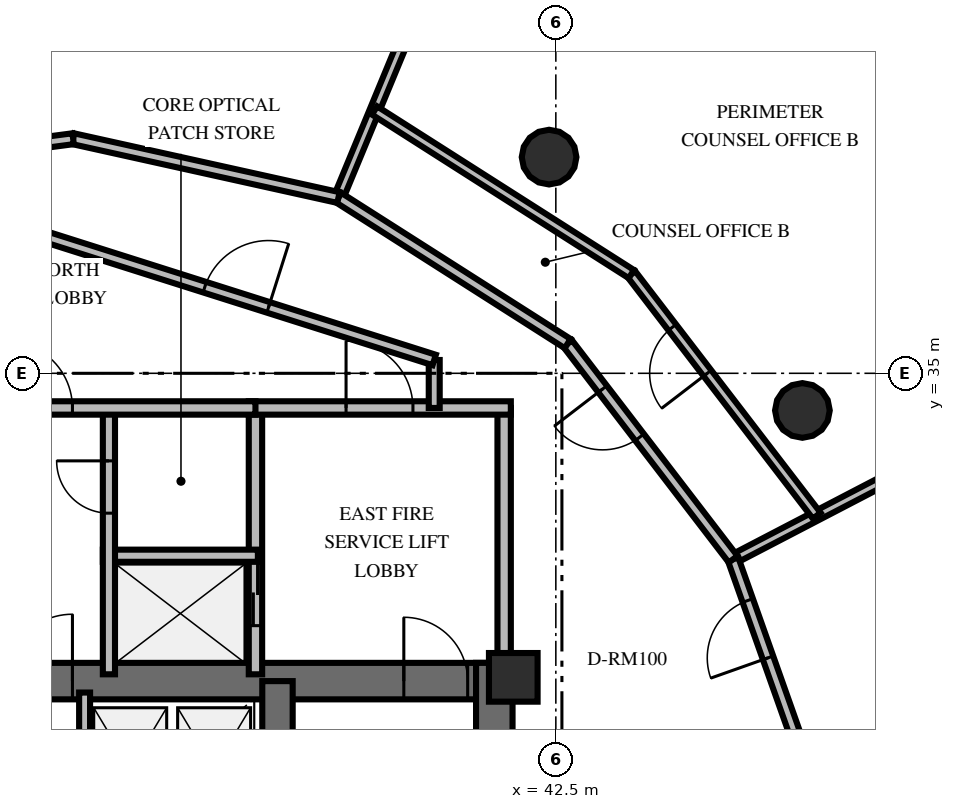
"""IFC4 building model, lengths in metres.
Left out: names, types, materials, properties, quantities, classifications, styles, units other than length and angle.
Written with IfcOpenShell. Run it as: python <this file> out.ifc"""

import sys

from ifc_helpers import new_model, si_unit, direction, frame, frame_2d, origin, origin_2d, place, context, subcontext, project, spatial, rectangle, circle, extrude, element, fill, save


model = new_model("IFC4")
c1 = context("Model", 3, precision=1e-05, world=origin(), true_north=direction((0.0, 1.0)))
c2 = subcontext(c1, "Body", "Model", "MODEL_VIEW")
j1 = project(units=[si_unit("LENGTHUNIT", "METRE"), si_unit("PLANEANGLEUNIT", "RADIAN")], contexts=[c1])
p1 = place(None, origin())
s1 = spatial("IfcSite", under=j1, at=p1, CompositionType="ELEMENT")
p2 = place(p1, origin())
s2 = spatial("IfcBuilding", under=s1, at=p2, CompositionType="ELEMENT")
p3 = place(p2, frame((0.0, 0.0, 230.4)))
s3 = spatial("IfcBuildingStorey", under=s2, at=p3, CompositionType="ELEMENT", Elevation=230.4)
p4 = place(p3, frame((26.222, 29.938, 0.0), z_axis=(0.0, 0.0, 1.0), x_axis=(1.0, 0.0, 0.0)))
e1 = element("IfcWall", 1, at=p4, inside=s3, PredefinedType="SHEAR", context=c2, shape_type="SweptSolid", body=[
    extrude(rectangle(XDim=15.566, YDim=0.6, at=frame_2d((7.783, 0.0))), origin(), (0.0, 0.0, 1.0), 3.6),
])
p5 = place(p4, frame((0.728, 0.0, 0.0)))
e2 = element("IfcOpeningElement", 2, at=p5, cuts=e1, PredefinedType="OPENING", context=c2, shape_type="SweptSolid", body=[
    extrude(rectangle(XDim=1.05, YDim=2.15, at=frame_2d((0.525, 1.075))), frame((0.0, 0.31, 0.0), z_axis=(0.0, -1.0, 0.0), x_axis=(1.0, 0.0, 0.0)), (0.0, 0.0, 1.0), 0.62),
])
p6 = place(p4, frame((13.778, 0.0, 0.0)))
e3 = element("IfcOpeningElement", 3, at=p6, cuts=e1, PredefinedType="OPENING", context=c2, shape_type="SweptSolid", body=[
    extrude(rectangle(XDim=1.05, YDim=2.15, at=frame_2d((0.525, 1.075))), frame((0.0, 0.31, 0.0), z_axis=(0.0, -1.0, 0.0), x_axis=(1.0, 0.0, 0.0)), (0.0, 0.0, 1.0), 0.62),
])
p7 = place(p4, frame((7.228, 0.0, 0.0)))
e4 = element("IfcOpeningElement", 4, at=p7, cuts=e1, PredefinedType="OPENING", context=c2, shape_type="SweptSolid", body=[
    extrude(rectangle(XDim=1.1, YDim=2.15, at=frame_2d((0.55, 1.075))), frame((0.0, 0.31, 0.0), z_axis=(0.0, -1.0, 0.0), x_axis=(1.0, 0.0, 0.0)), (0.0, 0.0, 1.0), 0.62),
])
p8 = place(p3, frame((41.488, 19.962, 0.0), z_axis=(0.0, 0.0, 1.0), x_axis=(0.0, 1.0, 0.0)))
e5 = element("IfcWall", 5, at=p8, inside=s3, PredefinedType="SHEAR", context=c2, shape_type="SweptSolid", body=[
    extrude(rectangle(XDim=10.276, YDim=0.6, at=frame_2d((5.138, 0.0))), origin(), (0.0, 0.0, 1.0), 3.6),
])
p9 = place(p3, frame((37.922, 20.262, 0.0), z_axis=(0.0, 0.0, 1.0), x_axis=(0.0, 1.0, 0.0)))
e6 = element("IfcWall", 6, at=p9, inside=s3, PredefinedType="SHEAR", context=c2, shape_type="SweptSolid", body=[
    extrude(rectangle(XDim=9.676, YDim=0.5, at=frame_2d((4.838, 0.0))), origin(), (0.0, 0.0, 1.0), 3.6),
])
p10 = place(p3, frame((41.8, 30.0, 0.0), z_axis=(0.0, 0.0, 1.0), x_axis=(1.0, 0.0, 0.0)))
e7 = element("IfcColumn", 7, at=p10, inside=s3, PredefinedType="PILASTER", context=c2, shape_type="SweptSolid", body=[
    extrude(rectangle(XDim=0.8, YDim=0.8, at=origin_2d()), origin(), (0.0, 0.0, 1.0), 3.6),
])
for number, where, z_axis, x_axis in (
    (8, (46.555, 34.389, -0.22), (0.0, 0.0, 1.0), (1.0, 0.0, 0.0)),
    (9, (42.389, 38.555, -0.22), (0.0, 0.0, 1.0), (1.0, 0.0, 0.0)),
):
    element("IfcColumn", number, at=place(p3, frame(where, z_axis=z_axis, x_axis=x_axis)), inside=s3, PredefinedType="COLUMN", context=c2, shape_type="SweptSolid", body=[
        extrude(circle(Radius=0.45, at=origin_2d()), origin(), (0.0, 0.0, 1.0), 3.82),
    ])
p11 = place(p3, frame((37.56, 30.05, 0.0), z_axis=(0.0, 0.0, 1.0), x_axis=(0.0, 1.0, 0.0)))
e10 = element("IfcWall", 10, at=p11, inside=s3, PredefinedType="SOLIDWALL", context=c2, shape_type="SweptSolid", body=[
    extrude(rectangle(XDim=4.38, YDim=0.22, at=frame_2d((2.19, 0.0))), origin(), (0.0, 0.0, 1.0), 2.46),
])
p12 = place(p11, frame((0.8, 0.0, 0.0)))
e11 = element("IfcOpeningElement", 11, at=p12, cuts=e10, PredefinedType="OPENING", context=c2, shape_type="SweptSolid", body=[
    extrude(rectangle(XDim=1.05, YDim=2.1, at=frame_2d((0.525, 1.05))), frame((0.0, 0.12, 0.0), z_axis=(0.0, -1.0, 0.0), x_axis=(1.0, 0.0, 0.0)), (0.0, 0.0, 1.0), 0.24),
])
p13 = place(p3, frame((41.65, 30.05, 0.0), z_axis=(0.0, 0.0, 1.0), x_axis=(0.0, 1.0, 0.0)))
e12 = element("IfcWall", 12, at=p13, inside=s3, PredefinedType="SOLIDWALL", context=c2, shape_type="SweptSolid", body=[
    extrude(rectangle(XDim=4.38, YDim=0.22, at=frame_2d((2.19, 0.0))), origin(), (0.0, 0.0, 1.0), 2.46),
])
p14 = place(p3, frame((37.45, 34.43, 0.0), z_axis=(0.0, 0.0, 1.0), x_axis=(1.0, 0.0, 0.0)))
e13 = element("IfcWall", 13, at=p14, inside=s3, PredefinedType="SOLIDWALL", context=c2, shape_type="SweptSolid", body=[
    extrude(rectangle(XDim=4.31, YDim=0.22, at=frame_2d((2.155, 0.0))), origin(), (0.0, 0.0, 1.0), 2.46),
])
p15 = place(p14, frame((1.6, 0.0, 0.0)))
e14 = element("IfcOpeningElement", 14, at=p15, cuts=e13, PredefinedType="OPENING", context=c2, shape_type="SweptSolid", body=[
    extrude(rectangle(XDim=1.1, YDim=2.15, at=frame_2d((0.55, 1.075))), frame((0.0, 0.12, 0.0), z_axis=(0.0, -1.0, 0.0), x_axis=(1.0, 0.0, 0.0)), (0.0, 0.0, 1.0), 0.24),
])
p16 = place(p3, frame((35.05, 32.0, 0.0), z_axis=(0.0, 0.0, 1.0), x_axis=(1.0, 0.0, 0.0)))
e15 = element("IfcWall", 15, at=p16, inside=s3, PredefinedType="SOLIDWALL", context=c2, shape_type="SweptSolid", body=[
    extrude(rectangle(XDim=2.55, YDim=0.2, at=frame_2d((1.275, 0.0))), origin(), (0.0, 0.0, 1.0), 2.46),
])
p17 = place(p3, frame((35.15, 30.05, 0.0), z_axis=(0.0, 0.0, 1.0), x_axis=(0.0, 1.0, 0.0)))
e16 = element("IfcWall", 16, at=p17, inside=s3, PredefinedType="SOLIDWALL", context=c2, shape_type="SweptSolid", body=[
    extrude(rectangle(XDim=4.38, YDim=0.2, at=frame_2d((2.19, 0.0))), origin(), (0.0, 0.0, 1.0), 2.46),
])
p18 = place(p17, frame((2.65, 0.0, 0.0)))
e17 = element("IfcOpeningElement", 17, at=p18, cuts=e16, PredefinedType="OPENING", context=c2, shape_type="SweptSolid", body=[
    extrude(rectangle(XDim=0.86, YDim=2.05, at=frame_2d((0.43, 1.025))), frame((0.0, 0.11, 0.0), z_axis=(0.0, -1.0, 0.0), x_axis=(1.0, 0.0, 0.0)), (0.0, 0.0, 1.0), 0.22),
])
p19 = place(p3, frame((30.44, 34.43, 0.0), z_axis=(0.0, 0.0, 1.0), x_axis=(1.0, 0.0, 0.0)))
e18 = element("IfcWall", 18, at=p19, inside=s3, PredefinedType="SOLIDWALL", context=c2, shape_type="SweptSolid", body=[
    extrude(rectangle(XDim=7.12, YDim=0.22, at=frame_2d((3.56, 0.0))), origin(), (0.0, 0.0, 1.0), 2.46),
])
p20 = place(p19, frame((3.01, 0.0, 0.0)))
e19 = element("IfcOpeningElement", 19, at=p20, cuts=e18, PredefinedType="OPENING", context=c2, shape_type="SweptSolid", body=[
    extrude(rectangle(XDim=1.1, YDim=2.15, at=frame_2d((0.55, 1.075))), frame((0.0, 0.12, 0.0), z_axis=(0.0, -1.0, 0.0), x_axis=(1.0, 0.0, 0.0)), (0.0, 0.0, 1.0), 0.24),
])
p21 = place(p3, frame((34.75, 27.28, 0.0), z_axis=(0.0, 0.0, 1.0), x_axis=(0.0, 1.0, 0.0)))
e20 = element("IfcWall", 20, at=p21, inside=s3, PredefinedType="SOLIDWALL", context=c2, shape_type="SweptSolid", body=[
    extrude(rectangle(XDim=2.47, YDim=0.18, at=frame_2d((1.235, 0.0))), origin(), (0.0, 0.0, 1.0), 2.46),
])
p22 = place(p3, frame((40.5, 35.219, 0.0), z_axis=(0.0, 0.0, 1.0), x_axis=(0.0, -1.0, 0.0)))
e21 = element("IfcWall", 21, at=p22, inside=s3, PredefinedType="PARTITIONING", context=c2, shape_type="SweptSolid", body=[
    extrude(rectangle(XDim=0.789, YDim=0.18, at=frame_2d((0.395, 0.0))), origin(), (0.0, 0.0, 1.0), 2.46),
])
p23 = place(p3, frame((34.0, 37.28, 0.0), z_axis=(0.0, 0.0, 1.0), x_axis=(0.953228121756, -0.302251795518, 0.0)))
e22 = element("IfcWall", 22, at=p23, inside=s3, PredefinedType="PARTITIONING", context=c2, shape_type="SweptSolid", body=[
    extrude(rectangle(XDim=6.819, YDim=0.18, at=frame_2d((3.409, 0.0))), origin(), (0.0, 0.0, 1.0), 2.46),
])
p24 = place(p23, frame((2.86, 0.0, 0.0)))
e23 = element("IfcOpeningElement", 23, at=p24, cuts=e22, PredefinedType="OPENING", context=c2, shape_type="SweptSolid", body=[
    extrude(rectangle(XDim=1.1, YDim=2.15, at=frame_2d((0.55, 1.075))), frame((0.0, 0.1, 0.0), z_axis=(0.0, -1.0, 0.0), x_axis=(1.0, 0.0, 0.0)), (0.0, 0.0, 1.0), 0.2),
])
p25 = place(p3, frame((45.416, 31.943, 0.0), z_axis=(0.0, 0.0, 1.0), x_axis=(0.887002051681, 0.461765481943, 0.0)))
e24 = element("IfcWall", 24, at=p25, inside=s3, PredefinedType="PARTITIONING", context=c2, shape_type="SweptSolid", body=[
    extrude(rectangle(XDim=7.318, YDim=0.16, at=frame_2d((3.659, 0.0))), origin(), (0.0, 0.0, 1.0), 2.46),
])
p26 = place(p3, frame((46.612, 28.566, 0.0), z_axis=(0.0, 0.0, 1.0), x_axis=(-0.33381812474, 0.942637501691, 0.0)))
e25 = element("IfcWall", 25, at=p26, inside=s3, PredefinedType="PARTITIONING", context=c2, shape_type="SweptSolid", body=[
    extrude(rectangle(XDim=3.582, YDim=0.18, at=frame_2d((1.791, 0.0))), origin(), (0.0, 0.0, 1.0), 2.46),
])
p27 = place(p26, frame((1.862, 0.0, 0.0)))
e26 = element("IfcOpeningElement", 26, at=p27, cuts=e25, PredefinedType="OPENING", context=c2, shape_type="SweptSolid", body=[
    extrude(rectangle(XDim=1.0, YDim=2.15, at=frame_2d((0.5, 1.075))), frame((0.0, 0.1, 0.0), z_axis=(0.0, -1.0, 0.0), x_axis=(1.0, 0.0, 0.0)), (0.0, 0.0, 1.0), 0.2),
])
p28 = place(p3, frame((38.925, 37.89, 0.0), z_axis=(0.0, 0.0, 1.0), x_axis=(0.382676871851, 0.923882249938, 0.0)))
e27 = element("IfcWall", 27, at=p28, inside=s3, PredefinedType="PARTITIONING", context=c2, shape_type="SweptSolid", body=[
    extrude(rectangle(XDim=7.318, YDim=0.16, at=frame_2d((3.659, 0.0))), origin(), (0.0, 0.0, 1.0), 2.46),
])
p29 = place(p3, frame((45.416, 31.943, 0.0), z_axis=(0.0, 0.0, 1.0), x_axis=(-0.608746835117, 0.793364538365, 0.0)))
e28 = element("IfcWall", 28, at=p29, inside=s3, PredefinedType="PARTITIONING", context=c2, shape_type="SweptSolid", body=[
    extrude(rectangle(XDim=4.47, YDim=0.18, at=frame_2d((2.235, 0.0))), origin(), (0.0, 0.0, 1.0), 2.46),
])
p30 = place(p29, frame((2.527, 0.0, 0.0)))
e29 = element("IfcOpeningElement", 29, at=p30, cuts=e28, PredefinedType="OPENING", context=c2, shape_type="SweptSolid", body=[
    extrude(rectangle(XDim=1.0, YDim=2.15, at=frame_2d((0.5, 1.075))), frame((0.0, 0.1, 0.0), z_axis=(0.0, -1.0, 0.0), x_axis=(1.0, 0.0, 0.0)), (0.0, 0.0, 1.0), 0.2),
])
p31 = place(p3, frame((42.695, 35.489, 0.0), z_axis=(0.0, 0.0, 1.0), x_axis=(-0.843391492769, 0.53729953464, 0.0)))
e30 = element("IfcWall", 30, at=p31, inside=s3, PredefinedType="PARTITIONING", context=c2, shape_type="SweptSolid", body=[
    extrude(rectangle(XDim=4.47, YDim=0.18, at=frame_2d((2.235, 0.0))), origin(), (0.0, 0.0, 1.0), 2.46),
])
p32 = place(p3, frame((46.791, 32.658, 0.0), z_axis=(0.0, 0.0, 1.0), x_axis=(-0.608777402424, 0.793341083203, 0.0)))
e31 = element("IfcWall", 31, at=p32, inside=s3, PredefinedType="PARTITIONING", context=c2, shape_type="SweptSolid", body=[
    extrude(rectangle(XDim=5.008, YDim=0.16, at=frame_2d((2.504, 0.0))), origin(), (0.0, 0.0, 1.0), 2.46),
])
p33 = place(p32, frame((2.954, 0.0, 0.0)))
e32 = element("IfcOpeningElement", 32, at=p33, cuts=e31, PredefinedType="OPENING", context=c2, shape_type="SweptSolid", body=[
    extrude(rectangle(XDim=0.95, YDim=2.15, at=frame_2d((0.475, 1.075))), frame((0.0, 0.09, 0.0), z_axis=(0.0, -1.0, 0.0), x_axis=(1.0, 0.0, 0.0)), (0.0, 0.0, 1.0), 0.18),
])
p34 = place(p3, frame((43.742, 36.632, 0.0), z_axis=(0.0, 0.0, 1.0), x_axis=(-0.84339841599, 0.537288667204, 0.0)))
e33 = element("IfcWall", 33, at=p34, inside=s3, PredefinedType="PARTITIONING", context=c2, shape_type="SweptSolid", body=[
    extrude(rectangle(XDim=5.008, YDim=0.16, at=frame_2d((2.504, 0.0))), origin(), (0.0, 0.0, 1.0), 2.46),
])
p35 = place(p3, frame((38.925, 37.89, 0.0), z_axis=(0.0, 0.0, 1.0), x_axis=(-0.976291048481, 0.216461979699, 0.0)))
e34 = element("IfcWall", 34, at=p35, inside=s3, PredefinedType="PARTITIONING", context=c2, shape_type="SweptSolid", body=[
    extrude(rectangle(XDim=4.47, YDim=0.18, at=frame_2d((2.235, 0.0))), origin(), (0.0, 0.0, 1.0), 2.46),
])
p36 = place(p3, frame((34.561, 38.858, 0.0), z_axis=(0.0, 0.0, 1.0), x_axis=(-0.991442206796, -0.130546354154, 0.0)))
e35 = element("IfcWall", 35, at=p36, inside=s3, PredefinedType="PARTITIONING", context=c2, shape_type="SweptSolid", body=[
    extrude(rectangle(XDim=4.47, YDim=0.18, at=frame_2d((2.235, 0.0))), origin(), (0.0, 0.0, 1.0), 2.46),
])
p37 = place(p36, frame((0.942, 0.0, 0.0)))
e36 = element("IfcOpeningElement", 36, at=p37, cuts=e35, PredefinedType="OPENING", context=c2, shape_type="SweptSolid", body=[
    extrude(rectangle(XDim=1.0, YDim=2.15, at=frame_2d((0.5, 1.075))), frame((0.0, 0.1, 0.0), z_axis=(0.0, -1.0, 0.0), x_axis=(1.0, 0.0, 0.0)), (0.0, 0.0, 1.0), 0.2),
])
p38 = place(p6, origin())
e37 = element("IfcDoor", 37, at=p38, inside=s3, OperationType="SINGLE_SWING_LEFT", PredefinedType="DOOR", context=c2, shape_type="SweptSolid", body=[
    extrude(rectangle(XDim=1.05, YDim=2.15, at=frame_2d((0.525, 1.075))), frame((0.0, 0.025, 0.0), z_axis=(0.0, -1.0, 0.0), x_axis=(1.0, 0.0, 0.0)), (0.0, 0.0, 1.0), 0.05),
])
fill(e3, e37)
p39 = place(p7, origin())
e38 = element("IfcDoor", 38, at=p39, inside=s3, OperationType="SINGLE_SWING_RIGHT", PredefinedType="DOOR", context=c2, shape_type="SweptSolid", body=[
    extrude(rectangle(XDim=1.1, YDim=2.15, at=frame_2d((0.55, 1.075))), frame((0.0, 0.025, 0.0), z_axis=(0.0, -1.0, 0.0), x_axis=(1.0, 0.0, 0.0)), (0.0, 0.0, 1.0), 0.05),
])
fill(e4, e38)
p40 = place(p15, origin())
e39 = element("IfcDoor", 39, at=p40, inside=s3, OperationType="SINGLE_SWING_LEFT", PredefinedType="DOOR", context=c2, shape_type="SweptSolid", body=[
    extrude(rectangle(XDim=1.1, YDim=2.15, at=frame_2d((0.55, 1.075))), frame((0.0, 0.025, 0.0), z_axis=(0.0, -1.0, 0.0), x_axis=(1.0, 0.0, 0.0)), (0.0, 0.0, 1.0), 0.05),
])
fill(e14, e39)
p41 = place(p12, origin())
e40 = element("IfcDoor", 40, at=p41, inside=s3, OperationType="DOUBLE_DOOR_SLIDING", PredefinedType="USERDEFINED", context=c2, shape_type="SweptSolid", body=[
    extrude(rectangle(XDim=1.05, YDim=2.1, at=frame_2d((0.525, 1.05))), frame((0.0, 0.025, 0.0), z_axis=(0.0, -1.0, 0.0), x_axis=(1.0, 0.0, 0.0)), (0.0, 0.0, 1.0), 0.05),
])
fill(e11, e40)
p42 = place(p18, origin())
e41 = element("IfcDoor", 41, at=p42, inside=s3, OperationType="SINGLE_SWING_RIGHT", PredefinedType="TRAPDOOR", context=c2, shape_type="SweptSolid", body=[
    extrude(rectangle(XDim=0.86, YDim=2.05, at=frame_2d((0.43, 1.025))), frame((0.0, 0.025, 0.0), z_axis=(0.0, -1.0, 0.0), x_axis=(1.0, 0.0, 0.0)), (0.0, 0.0, 1.0), 0.05),
])
fill(e17, e41)
p43 = place(p20, origin())
e42 = element("IfcDoor", 42, at=p43, inside=s3, OperationType="SINGLE_SWING_LEFT", PredefinedType="DOOR", context=c2, shape_type="SweptSolid", body=[
    extrude(rectangle(XDim=1.1, YDim=2.15, at=frame_2d((0.55, 1.075))), frame((0.0, 0.025, 0.0), z_axis=(0.0, -1.0, 0.0), x_axis=(1.0, 0.0, 0.0)), (0.0, 0.0, 1.0), 0.05),
])
fill(e19, e42)
p44 = place(p24, origin())
e43 = element("IfcDoor", 43, at=p44, inside=s3, OperationType="SINGLE_SWING_RIGHT", PredefinedType="DOOR", context=c2, shape_type="SweptSolid", body=[
    extrude(rectangle(XDim=1.1, YDim=2.15, at=frame_2d((0.55, 1.075))), frame((0.0, 0.025, 0.0), z_axis=(0.0, -1.0, 0.0), x_axis=(1.0, 0.0, 0.0)), (0.0, 0.0, 1.0), 0.05),
])
fill(e23, e43)
p45 = place(p27, origin())
e44 = element("IfcDoor", 44, at=p45, inside=s3, OperationType="SINGLE_SWING_LEFT", PredefinedType="DOOR", context=c2, shape_type="SweptSolid", body=[
    extrude(rectangle(XDim=1.0, YDim=2.15, at=frame_2d((0.5, 1.075))), frame((0.0, 0.025, 0.0), z_axis=(0.0, -1.0, 0.0), x_axis=(1.0, 0.0, 0.0)), (0.0, 0.0, 1.0), 0.05),
])
fill(e26, e44)
p46 = place(p30, origin())
e45 = element("IfcDoor", 45, at=p46, inside=s3, OperationType="SINGLE_SWING_RIGHT", PredefinedType="DOOR", context=c2, shape_type="SweptSolid", body=[
    extrude(rectangle(XDim=1.0, YDim=2.15, at=frame_2d((0.5, 1.075))), frame((0.0, 0.025, 0.0), z_axis=(0.0, -1.0, 0.0), x_axis=(1.0, 0.0, 0.0)), (0.0, 0.0, 1.0), 0.05),
])
fill(e29, e45)
p47 = place(p33, origin())
e46 = element("IfcDoor", 46, at=p47, inside=s3, OperationType="SINGLE_SWING_LEFT", PredefinedType="DOOR", context=c2, shape_type="SweptSolid", body=[
    extrude(rectangle(XDim=0.95, YDim=2.15, at=frame_2d((0.475, 1.075))), frame((0.0, 0.025, 0.0), z_axis=(0.0, -1.0, 0.0), x_axis=(1.0, 0.0, 0.0)), (0.0, 0.0, 1.0), 0.05),
])
fill(e32, e46)
save(model, sys.argv[1])
